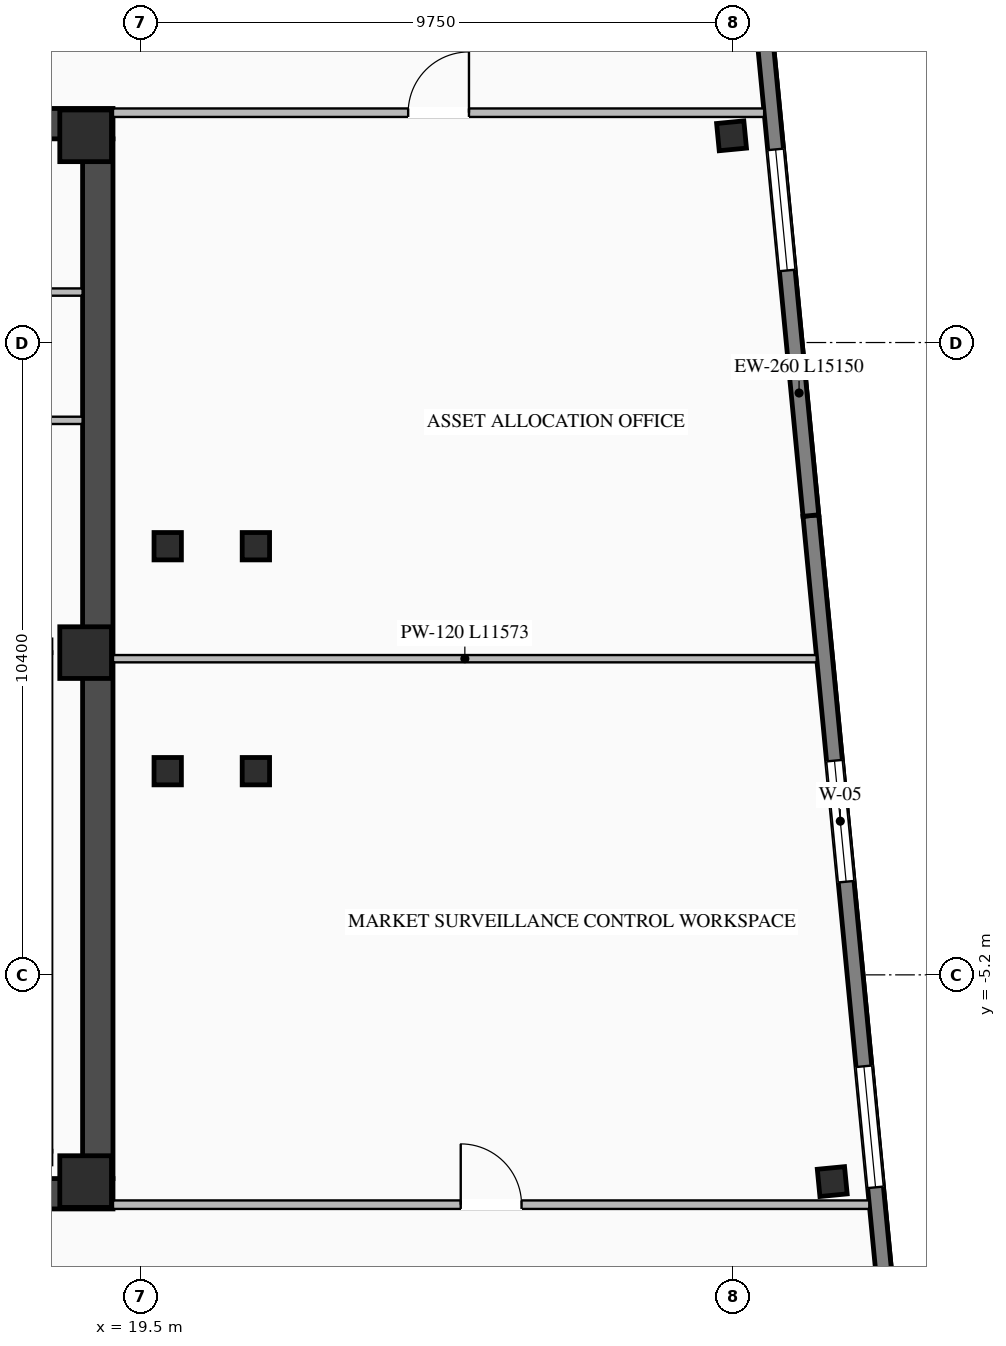
"""IFC4 building model, lengths in metres.
Left out: names, types, materials, properties, quantities, classifications, styles, units other than length and angle.
Written with IfcOpenShell. Run it as: python <this file> out.ifc"""

import sys

from ifc_helpers import new_model, si_unit, direction, frame, frame_2d, origin, origin_2d, place, context, subcontext, project, spatial, rectangle, i_section, extrude, element, fill, save


model = new_model("IFC4")
c1 = context("Model", 3, precision=1e-05, world=origin(), true_north=direction((0.0, 1.0)))
c2 = subcontext(c1, "Body", "Model", "MODEL_VIEW")
j1 = project(units=[si_unit("LENGTHUNIT", "METRE"), si_unit("PLANEANGLEUNIT", "RADIAN")], contexts=[c1])
p1 = place(None, origin())
s1 = spatial("IfcSite", under=j1, at=p1, CompositionType="ELEMENT")
p2 = place(p1, origin())
s2 = spatial("IfcBuilding", under=s1, at=p2, CompositionType="ELEMENT")
p3 = place(p2, frame((0.0, 0.0, 247.5)))
s3 = spatial("IfcBuildingStorey", under=s2, at=p3, CompositionType="ELEMENT", Elevation=247.5)
p4 = place(p3, frame((8.8, -8.8, 0.0), z_axis=(0.0, 0.0, 1.0), x_axis=(1.0, 0.0, 0.0)))
e1 = element("IfcWall", 1, at=p4, inside=s3, PredefinedType="SHEAR", context=c2, shape_type="SweptSolid", body=[
    extrude(rectangle(XDim=10.25, YDim=0.5, at=frame_2d((5.125, 0.0))), origin(), (0.0, 0.0, 1.0), 4.02),
])
p5 = place(p3, frame((8.8, 8.8, 0.0), z_axis=(0.0, 0.0, 1.0), x_axis=(1.0, 0.0, 0.0)))
e2 = element("IfcWall", 2, at=p5, inside=s3, PredefinedType="SHEAR", context=c2, shape_type="SweptSolid", body=[
    extrude(rectangle(XDim=10.25, YDim=0.5, at=frame_2d((5.125, 0.0))), origin(), (0.0, 0.0, 1.0), 4.02),
])
p6 = place(p5, frame((3.25, 0.0, 0.0)))
e3 = element("IfcOpeningElement", 3, at=p6, cuts=e2, PredefinedType="OPENING", context=c2, shape_type="SweptSolid", body=[
    extrude(rectangle(XDim=1.4, YDim=2.05, at=frame_2d((0.7, 1.025))), frame((0.0, 0.26, 0.0), z_axis=(0.0, -1.0, 0.0), x_axis=(1.0, 0.0, 0.0)), (0.0, 0.0, 1.0), 0.52),
])
p7 = place(p3, frame((18.8, -8.55, 0.0), z_axis=(0.0, 0.0, 1.0), x_axis=(0.0, 1.0, 0.0)))
e4 = element("IfcWall", 4, at=p7, inside=s3, PredefinedType="SHEAR", context=c2, shape_type="SweptSolid", body=[
    extrude(rectangle(XDim=17.1, YDim=0.5, at=frame_2d((8.55, 0.0))), origin(), (0.0, 0.0, 1.0), 4.02),
])
for number, where, z_axis, x_axis in (
    (5, (18.6, -8.6, 0.0), (0.0, 0.0, 1.0), (1.0, 0.0, 0.0)),
    (6, (18.6, 0.1, 0.0), (0.0, 0.0, 1.0), (1.0, 0.0, 0.0)),
    (7, (18.6, 8.6, 0.0), (0.0, 0.0, 1.0), (1.0, 0.0, 0.0)),
):
    element("IfcColumn", number, at=place(p3, frame(where, z_axis=z_axis, x_axis=x_axis)), inside=s3, PredefinedType="COLUMN", context=c2, shape_type="SweptSolid", body=[
        extrude(rectangle(XDim=0.85, YDim=0.85, at=origin_2d()), origin(), (0.0, 0.0, 1.0), 4.2),
    ])
for number, where, z_axis, x_axis in (
    (8, (19.95, -1.85, 0.0), (0.0, 0.0, 1.0), (1.0, 0.0, 0.0)),
    (9, (19.95, 1.85, 0.0), (0.0, 0.0, 1.0), (1.0, 0.0, 0.0)),
    (10, (21.4, -1.85, 0.0), (0.0, 0.0, 1.0), (1.0, 0.0, 0.0)),
    (11, (21.4, 1.85, 0.0), (0.0, 0.0, 1.0), (1.0, 0.0, 0.0)),
):
    element("IfcColumn", number, at=place(p3, frame(where, z_axis=z_axis, x_axis=x_axis)), inside=s3, PredefinedType="COLUMN", context=c2, shape_type="SweptSolid", body=[
        extrude(i_section(OverallWidth=0.45, OverallDepth=0.45, WebThickness=0.022, FlangeThickness=0.032, at=origin_2d()), origin(), (0.0, 0.0, 1.0), 4.2),
    ])
for number, where, z_axis, x_axis in (
    (12, (30.879, -8.6, -0.28), (0.0, 0.0, 1.0), (0.995, 0.096, 0.0)),
    (13, (29.223, 8.6, -0.28), (0.0, 0.0, 1.0), (0.995, 0.096, 0.0)),
):
    element("IfcColumn", number, at=place(p3, frame(where, z_axis=z_axis, x_axis=x_axis)), inside=s3, PredefinedType="COLUMN", context=c2, shape_type="SweptSolid", body=[
        extrude(i_section(OverallWidth=0.45, OverallDepth=0.45, WebThickness=0.022, FlangeThickness=0.032, at=origin_2d()), origin(), (0.0, 0.0, 1.0), 4.48),
    ])
p8 = place(p3, frame((30.527, 2.354, 0.0), z_axis=(0.0, 0.0, 1.0), x_axis=(0.095850890337, -0.995395703638, 0.0)))
e14 = element("IfcWall", 14, at=p8, inside=s3, PredefinedType="STANDARD", context=c2, shape_type="SweptSolid", body=[
    extrude(rectangle(XDim=15.15, YDim=0.26, at=frame_2d((7.575, 0.0))), origin(), (0.0, 0.0, 1.0), 4.0),
])
p9 = place(p8, frame((4.05, 0.0, 0.76)))
e15 = element("IfcOpeningElement", 15, at=p9, cuts=e14, PredefinedType="OPENING", context=c2, shape_type="SweptSolid", body=[
    extrude(rectangle(XDim=2.0, YDim=2.05, at=frame_2d((1.0, 1.025))), frame((0.0, 0.14, 0.0), z_axis=(0.0, -1.0, 0.0), x_axis=(1.0, 0.0, 0.0)), (0.0, 0.0, 1.0), 0.28),
])
p10 = place(p8, frame((9.1, 0.0, 0.76)))
e16 = element("IfcOpeningElement", 16, at=p10, cuts=e14, PredefinedType="OPENING", context=c2, shape_type="SweptSolid", body=[
    extrude(rectangle(XDim=2.0, YDim=2.05, at=frame_2d((1.0, 1.025))), frame((0.0, 0.14, 0.0), z_axis=(0.0, -1.0, 0.0), x_axis=(1.0, 0.0, 0.0)), (0.0, 0.0, 1.0), 0.28),
])
p11 = place(p3, frame((29.075, 17.435, 0.0), z_axis=(0.0, 0.0, 1.0), x_axis=(0.095850890337, -0.995395703638, 0.0)))
e17 = element("IfcWall", 17, at=p11, inside=s3, PredefinedType="STANDARD", context=c2, shape_type="SweptSolid", body=[
    extrude(rectangle(XDim=15.15, YDim=0.26, at=frame_2d((7.575, 0.0))), origin(), (0.0, 0.0, 1.0), 4.0),
])
p12 = place(p11, frame((4.05, 0.0, 0.76)))
e18 = element("IfcOpeningElement", 18, at=p12, cuts=e17, PredefinedType="OPENING", context=c2, shape_type="SweptSolid", body=[
    extrude(rectangle(XDim=2.0, YDim=2.05, at=frame_2d((1.0, 1.025))), frame((0.0, 0.14, 0.0), z_axis=(0.0, -1.0, 0.0), x_axis=(1.0, 0.0, 0.0)), (0.0, 0.0, 1.0), 0.28),
])
p13 = place(p11, frame((9.1, 0.0, 0.76)))
e19 = element("IfcOpeningElement", 19, at=p13, cuts=e17, PredefinedType="OPENING", context=c2, shape_type="SweptSolid", body=[
    extrude(rectangle(XDim=2.0, YDim=2.05, at=frame_2d((1.0, 1.025))), frame((0.0, 0.14, 0.0), z_axis=(0.0, -1.0, 0.0), x_axis=(1.0, 0.0, 0.0)), (0.0, 0.0, 1.0), 0.28),
])
p14 = place(p3, frame((13.9, 3.92, 0.0), z_axis=(0.0, 0.0, 1.0), x_axis=(1.0, 0.0, 0.0)))
e20 = element("IfcWall", 20, at=p14, inside=s3, PredefinedType="STANDARD", context=c2, shape_type="SweptSolid", body=[
    extrude(rectangle(XDim=4.65, YDim=0.12, at=frame_2d((2.325, 0.0))), origin(), (0.0, 0.0, 1.0), 4.0),
])
p15 = place(p3, frame((16.15, 6.03, 0.0), z_axis=(0.0, 0.0, 1.0), x_axis=(1.0, 0.0, 0.0)))
e21 = element("IfcWall", 21, at=p15, inside=s3, PredefinedType="STANDARD", context=c2, shape_type="SweptSolid", body=[
    extrude(rectangle(XDim=2.4, YDim=0.12, at=frame_2d((1.2, 0.0))), origin(), (0.0, 0.0, 1.0), 4.0),
])
p16 = place(p3, frame((19.05, 8.98, 0.0), z_axis=(0.0, 0.0, 1.0), x_axis=(1.0, 0.0, 0.0)))
e22 = element("IfcWall", 22, at=p16, inside=s3, PredefinedType="STANDARD", context=c2, shape_type="SweptSolid", body=[
    extrude(rectangle(XDim=10.709, YDim=0.14, at=frame_2d((5.354, 0.0))), origin(), (0.0, 0.0, 1.0), 4.0),
])
p17 = place(p16, frame((4.854, 0.0, 0.0)))
e23 = element("IfcOpeningElement", 23, at=p17, cuts=e22, PredefinedType="OPENING", context=c2, shape_type="SweptSolid", body=[
    extrude(rectangle(XDim=1.0, YDim=2.08, at=frame_2d((0.5, 1.04))), frame((0.0, 0.08, 0.0), z_axis=(0.0, -1.0, 0.0), x_axis=(1.0, 0.0, 0.0)), (0.0, 0.0, 1.0), 0.16),
])
p18 = place(p3, frame((19.05, -8.98, 0.0), z_axis=(0.0, 0.0, 1.0), x_axis=(1.0, 0.0, 0.0)))
e24 = element("IfcWall", 24, at=p18, inside=s3, PredefinedType="STANDARD", context=c2, shape_type="SweptSolid", body=[
    extrude(rectangle(XDim=12.438, YDim=0.14, at=frame_2d((6.219, 0.0))), origin(), (0.0, 0.0, 1.0), 4.0),
])
p19 = place(p18, frame((5.719, 0.0, 0.0)))
e25 = element("IfcOpeningElement", 25, at=p19, cuts=e24, PredefinedType="OPENING", context=c2, shape_type="SweptSolid", body=[
    extrude(rectangle(XDim=1.0, YDim=2.08, at=frame_2d((0.5, 1.04))), frame((0.0, 0.08, 0.0), z_axis=(0.0, -1.0, 0.0), x_axis=(1.0, 0.0, 0.0)), (0.0, 0.0, 1.0), 0.16),
])
p20 = place(p3, frame((19.05, 0.0, 0.0), z_axis=(0.0, 0.0, 1.0), x_axis=(1.0, 0.0, 0.0)))
e26 = element("IfcWall", 26, at=p20, inside=s3, PredefinedType="STANDARD", context=c2, shape_type="SweptSolid", body=[
    extrude(rectangle(XDim=11.573, YDim=0.12, at=frame_2d((5.787, 0.0))), origin(), (0.0, 0.0, 1.0), 3.595),
])
p21 = place(p9, origin())
e27 = element("IfcWindow", 27, at=p21, inside=s3, PartitioningType="DOUBLE_PANEL_VERTICAL", PredefinedType="WINDOW", context=c2, shape_type="SweptSolid", body=[
    extrude(rectangle(XDim=2.0, YDim=2.05, at=frame_2d((1.0, 1.025))), frame((0.0, 0.03, 0.0), z_axis=(0.0, -1.0, 0.0), x_axis=(1.0, 0.0, 0.0)), (0.0, 0.0, 1.0), 0.06),
])
fill(e15, e27)
p22 = place(p10, origin())
e28 = element("IfcWindow", 28, at=p22, inside=s3, PartitioningType="DOUBLE_PANEL_VERTICAL", PredefinedType="WINDOW", context=c2, shape_type="SweptSolid", body=[
    extrude(rectangle(XDim=2.0, YDim=2.05, at=frame_2d((1.0, 1.025))), frame((0.0, 0.03, 0.0), z_axis=(0.0, -1.0, 0.0), x_axis=(1.0, 0.0, 0.0)), (0.0, 0.0, 1.0), 0.06),
])
fill(e16, e28)
p23 = place(p13, origin())
e29 = element("IfcWindow", 29, at=p23, inside=s3, PartitioningType="DOUBLE_PANEL_VERTICAL", PredefinedType="WINDOW", context=c2, shape_type="SweptSolid", body=[
    extrude(rectangle(XDim=2.0, YDim=2.05, at=frame_2d((1.0, 1.025))), frame((0.0, 0.03, 0.0), z_axis=(0.0, -1.0, 0.0), x_axis=(1.0, 0.0, 0.0)), (0.0, 0.0, 1.0), 0.06),
])
fill(e19, e29)
p24 = place(p17, origin())
e30 = element("IfcDoor", 30, at=p24, inside=s3, OperationType="SINGLE_SWING_RIGHT", PredefinedType="DOOR", context=c2, shape_type="SweptSolid", body=[
    extrude(rectangle(XDim=1.0, YDim=2.08, at=frame_2d((0.5, 1.04))), frame((0.0, 0.025, 0.0), z_axis=(0.0, -1.0, 0.0), x_axis=(1.0, 0.0, 0.0)), (0.0, 0.0, 1.0), 0.05),
])
fill(e23, e30)
p25 = place(p19, origin())
e31 = element("IfcDoor", 31, at=p25, inside=s3, OperationType="SINGLE_SWING_LEFT", PredefinedType="DOOR", context=c2, shape_type="SweptSolid", body=[
    extrude(rectangle(XDim=1.0, YDim=2.08, at=frame_2d((0.5, 1.04))), frame((0.0, 0.025, 0.0), z_axis=(0.0, -1.0, 0.0), x_axis=(1.0, 0.0, 0.0)), (0.0, 0.0, 1.0), 0.05),
])
fill(e25, e31)
save(model, sys.argv[1])
